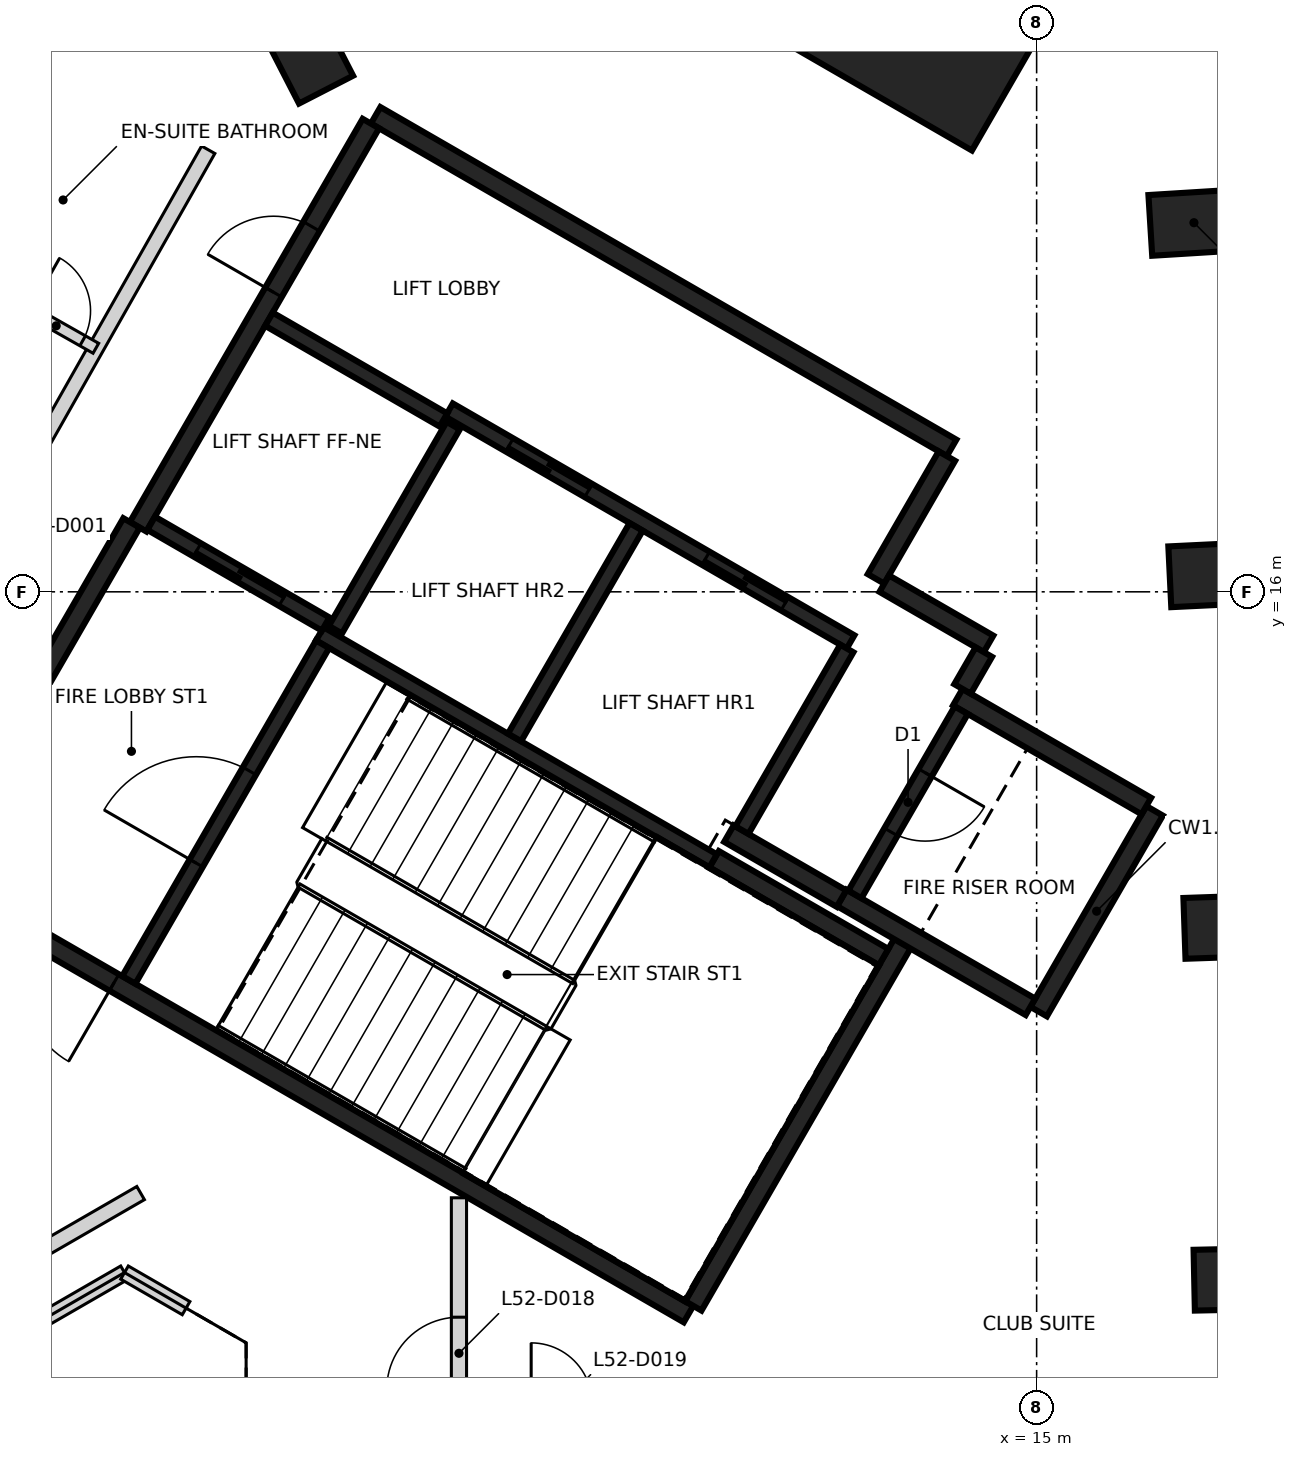
"""IFC4 building model, lengths in metres.
Left out: names, types, materials, properties, quantities, classifications, styles, units other than length and angle.
Written with IfcOpenShell. Run it as: python <this file> out.ifc"""

import sys

from ifc_helpers import new_model, si_unit, direction, frame, frame_2d, origin, origin_2d, place, context, subcontext, project, spatial, rectangle, extrude, element, fill, save


model = new_model("IFC4")
c1 = context("Model", 3, precision=1e-05, world=origin(), true_north=direction((0.0, 1.0)))
c2 = subcontext(c1, "Body", "Model", "MODEL_VIEW")
j1 = project(units=[si_unit("LENGTHUNIT", "METRE"), si_unit("PLANEANGLEUNIT", "RADIAN")], contexts=[c1])
p1 = place(None, origin())
s1 = spatial("IfcSite", under=j1, at=p1, CompositionType="ELEMENT")
p2 = place(p1, origin())
s2 = spatial("IfcBuilding", under=s1, at=p2, CompositionType="ELEMENT")
p3 = place(p2, frame((0.0, 0.0, 208.0)))
s3 = spatial("IfcBuildingStorey", under=s2, at=p3, CompositionType="ELEMENT", Elevation=208.0)
for number, where, z_axis, x_axis in (
    (1, (17.648, 6.956, -0.35), (0.0, 0.0, 1.0), (1.0, 0.021, 0.0)),
    (2, (17.519, 11.592, -0.35), (0.0, 0.0, 1.0), (0.999, 0.034, 0.0)),
    (3, (17.326, 16.226, -0.35), (0.0, 0.0, 1.0), (0.999, 0.048, 0.0)),
    (4, (17.07, 20.856, -0.35), (0.0, 0.0, 1.0), (0.998, 0.062, 0.0)),
    (5, (5.388, 23.118, -0.35), (0.0, 0.0, 1.0), (-0.458, 0.889, 0.0)),
):
    element("IfcColumn", number, at=place(p3, frame(where, z_axis=z_axis, x_axis=x_axis)), inside=s3, PredefinedType="COLUMN", context=c2, shape_type="SweptSolid", body=[
        extrude(rectangle(XDim=1.15, YDim=0.8, at=origin_2d()), origin(), (0.0, 0.0, 1.0), 2.736),
    ])
p4 = place(p3, frame((13.78, 23.867, -0.35), z_axis=(0.0, 0.0, 1.0), x_axis=(0.5, 0.866025403784, 0.0)))
e6 = element("IfcColumn", 6, at=p4, inside=s3, PredefinedType="COLUMN", context=c2, shape_type="SweptSolid", body=[
    extrude(rectangle(XDim=3.2, YDim=2.7, at=origin_2d()), origin(), (0.0, 0.0, 1.0), 3.55),
])
p5 = place(p3, frame((10.42, 6.498, 0.0), z_axis=(0.0, 0.0, 1.0), x_axis=(-0.866021906294, 0.500006057782, 0.0)))
e7 = element("IfcWall", 7, at=p5, inside=s3, PredefinedType="SHEAR", context=c2, shape_type="SweptSolid", body=[
    extrude(rectangle(XDim=11.55, YDim=0.25, at=frame_2d((5.775, 0.0))), origin(), (0.0, 0.0, 1.0), 3.2),
])
p6 = place(p5, frame((10.025, 0.0, 0.0)))
e8 = element("IfcOpeningElement", 8, at=p6, cuts=e7, PredefinedType="OPENING", context=c2, shape_type="SweptSolid", body=[
    extrude(rectangle(XDim=1.2, YDim=2.1, at=frame_2d((0.6, 1.05))), frame((0.0, 0.135, 0.0), z_axis=(0.0, -1.0, 0.0), x_axis=(1.0, 0.0, 0.0)), (0.0, 0.0, 1.0), 0.27),
])
p7 = place(p5, frame((8.725, 0.0, 0.0)))
e9 = element("IfcOpeningElement", 9, at=p7, cuts=e7, PredefinedType="OPENING", context=c2, shape_type="SweptSolid", body=[
    extrude(rectangle(XDim=1.2, YDim=2.1, at=frame_2d((0.6, 1.05))), frame((0.0, 0.135, 0.0), z_axis=(0.0, -1.0, 0.0), x_axis=(1.0, 0.0, 0.0)), (0.0, 0.0, 1.0), 0.27),
])
p8 = place(p3, frame((6.304, 22.269, 0.0), z_axis=(0.0, 0.0, 1.0), x_axis=(0.866022959057, -0.500004234368, 0.0)))
e10 = element("IfcWall", 10, at=p8, inside=s3, PredefinedType="SHEAR", context=c2, shape_type="SweptSolid", body=[
    extrude(rectangle(XDim=8.75, YDim=0.25, at=frame_2d((4.375, 0.0))), origin(), (0.0, 0.0, 1.0), 3.2),
])
p9 = place(p3, frame((3.179, 16.856, 0.0), z_axis=(0.0, 0.0, 1.0), x_axis=(0.500001955336, 0.866024274868, 0.0)))
e11 = element("IfcWall", 11, at=p9, inside=s3, PredefinedType="SHEAR", context=c2, shape_type="SweptSolid", body=[
    extrude(rectangle(XDim=6.125, YDim=0.25, at=frame_2d((3.062, 0.0))), origin(), (0.0, 0.0, 1.0), 3.2),
])
p10 = place(p9, frame((3.563, 0.0, 0.0)))
e12 = element("IfcOpeningElement", 12, at=p10, cuts=e11, PredefinedType="OPENING", context=c2, shape_type="SweptSolid", body=[
    extrude(rectangle(XDim=1.0, YDim=2.1, at=frame_2d((0.5, 1.05))), frame((0.0, 0.135, 0.0), z_axis=(0.0, -1.0, 0.0), x_axis=(1.0, 0.0, 0.0)), (0.0, 0.0, 1.0), 0.27),
])
p11 = place(p3, frame((0.48, 12.381, 0.0), z_axis=(0.0, 0.0, 1.0), x_axis=(0.49999885962, 0.866026062182, 0.0)))
e13 = element("IfcWall", 13, at=p11, inside=s3, PredefinedType="SHEAR", context=c2, shape_type="SweptSolid", body=[
    extrude(rectangle(XDim=5.225, YDim=0.25, at=frame_2d((2.612, 0.0))), origin(), (0.0, 0.0, 1.0), 3.2),
])
p12 = place(p3, frame((13.238, 11.378, 0.0), z_axis=(0.0, 0.0, 1.0), x_axis=(-0.500008851346, -0.866020293397, 0.0)))
e14 = element("IfcWall", 14, at=p12, inside=s3, PredefinedType="SHEAR", context=c2, shape_type="SweptSolid", body=[
    extrude(rectangle(XDim=5.51, YDim=0.25, at=frame_2d((2.755, 0.0))), origin(), (0.0, 0.0, 1.0), 3.2),
])
p13 = place(p3, frame((16.552, 13.119, 0.0), z_axis=(0.0, 0.0, 1.0), x_axis=(-0.499978833458, -0.866037623948, 0.0)))
e15 = element("IfcWall", 15, at=p13, inside=s3, PredefinedType="SHEAR", context=c2, shape_type="SweptSolid", body=[
    extrude(rectangle(XDim=3.05, YDim=0.25, at=frame_2d((1.525, 0.0))), origin(), (0.0, 0.0, 1.0), 3.2),
])
p14 = place(p3, frame((14.918, 10.54, 0.0), z_axis=(0.0, 0.0, 1.0), x_axis=(-0.866063538972, 0.499933942099, 0.0)))
e16 = element("IfcWall", 16, at=p14, inside=s3, PredefinedType="SHEAR", context=c2, shape_type="SweptSolid", body=[
    extrude(rectangle(XDim=2.865, YDim=0.25, at=frame_2d((1.432, 0.0))), origin(), (0.0, 0.0, 1.0), 3.2),
])
p15 = place(p3, frame((13.963, 14.614, 0.0), z_axis=(0.0, 0.0, 1.0), x_axis=(0.866042235819, -0.499970844928, 0.0)))
e17 = element("IfcWall", 17, at=p15, inside=s3, PredefinedType="SHEAR", context=c2, shape_type="SweptSolid", body=[
    extrude(rectangle(XDim=2.865, YDim=0.25, at=frame_2d((1.432, 0.0))), origin(), (0.0, 0.0, 1.0), 3.2),
])
p16 = place(p3, frame((10.757, 12.481, 0.0), z_axis=(0.0, 0.0, 1.0), x_axis=(0.866022940537, -0.500004266446, 0.0)))
e18 = element("IfcWall", 18, at=p16, inside=s3, PredefinedType="SHEAR", context=c2, shape_type="SweptSolid", body=[
    extrude(rectangle(XDim=2.575, YDim=0.25, at=frame_2d((1.287, 0.0))), origin(), (0.0, 0.0, 1.0), 3.2),
])
p17 = place(p3, frame((13.819, 17.785, 0.0), z_axis=(0.0, 0.0, 1.0), x_axis=(-0.500039802285, -0.866002422705, 0.0)))
e19 = element("IfcWall", 19, at=p17, inside=s3, PredefinedType="SHEAR", context=c2, shape_type="SweptSolid", body=[
    extrude(rectangle(XDim=1.865, YDim=0.25, at=frame_2d((0.932, 0.0))), origin(), (0.0, 0.0, 1.0), 3.2),
])
p18 = place(p3, frame((12.433, 11.964, 0.0), z_axis=(0.0, 0.0, 1.0), x_axis=(-0.866038183914, 0.499977863513, 0.0)))
e20 = element("IfcWall", 20, at=p18, inside=s3, PredefinedType="SHEAR", context=c2, shape_type="SweptSolid", body=[
    extrude(rectangle(XDim=1.71, YDim=0.25, at=frame_2d((0.855, 0.0))), origin(), (0.0, 0.0, 1.0), 3.2),
])
p19 = place(p3, frame((12.995, 16.108, 0.0), z_axis=(0.0, 0.0, 1.0), x_axis=(0.866044474677, -0.49996696679, 0.0)))
e21 = element("IfcWall", 21, at=p19, inside=s3, PredefinedType="SHEAR", context=c2, shape_type="SweptSolid", body=[
    extrude(rectangle(XDim=1.584, YDim=0.25, at=frame_2d((0.792, 0.0))), origin(), (0.0, 0.0, 1.0), 3.2),
])
p20 = place(p3, frame((14.305, 15.207, 0.0), z_axis=(0.0, 0.0, 1.0), x_axis=(-0.499848422343, -0.866112899501, 0.0)))
e22 = element("IfcWall", 22, at=p20, inside=s3, PredefinedType="SHEAR", context=c2, shape_type="SweptSolid", body=[
    extrude(rectangle(XDim=0.559, YDim=0.25, at=frame_2d((0.28, 0.0))), origin(), (0.0, 0.0, 1.0), 3.2),
])
p21 = place(p3, frame((12.552, 15.342, 0.0), z_axis=(0.0, 0.0, 1.0), x_axis=(-0.866030299012, 0.499991521122, 0.0)))
e23 = element("IfcWall", 23, at=p21, inside=s3, PredefinedType="SHEAR", context=c2, shape_type="SweptSolid", body=[
    extrude(rectangle(XDim=6.1, YDim=0.2, at=frame_2d((3.05, 0.0))), origin(), (0.0, 0.0, 1.0), 3.2),
])
p22 = place(p21, frame((1.0, 0.0, 0.0)))
e24 = element("IfcOpeningElement", 24, at=p22, cuts=e23, PredefinedType="OPENING", context=c2, shape_type="SweptSolid", body=[
    extrude(rectangle(XDim=1.2, YDim=2.1, at=frame_2d((0.6, 1.05))), frame((0.0, 0.11, 0.0), z_axis=(0.0, -1.0, 0.0), x_axis=(1.0, 0.0, 0.0)), (0.0, 0.0, 1.0), 0.22),
])
p23 = place(p21, frame((3.982, 0.0, 0.0)))
e25 = element("IfcOpeningElement", 25, at=p23, cuts=e23, PredefinedType="OPENING", context=c2, shape_type="SweptSolid", body=[
    extrude(rectangle(XDim=1.2, YDim=2.1, at=frame_2d((0.6, 1.05))), frame((0.0, 0.11, 0.0), z_axis=(0.0, -1.0, 0.0), x_axis=(1.0, 0.0, 0.0)), (0.0, 0.0, 1.0), 0.22),
])
p24 = place(p3, frame((10.743, 12.46, 0.0), z_axis=(0.0, 0.0, 1.0), x_axis=(-0.866018848283, 0.500011354289, 0.0)))
e26 = element("IfcWall", 26, at=p24, inside=s3, PredefinedType="SHEAR", context=c2, shape_type="SweptSolid", body=[
    extrude(rectangle(XDim=5.974, YDim=0.2, at=frame_2d((2.987, 0.0))), origin(), (0.0, 0.0, 1.0), 3.2),
])
p25 = place(p3, frame((3.057, 10.895, 0.0), z_axis=(0.0, 0.0, 1.0), x_axis=(0.500027839223, 0.866009330205, 0.0)))
e27 = element("IfcWall", 27, at=p25, inside=s3, PredefinedType="SHEAR", context=c2, shape_type="SweptSolid", body=[
    extrude(rectangle(XDim=5.098, YDim=0.2, at=frame_2d((2.549, 0.0))), origin(), (0.0, 0.0, 1.0), 3.2),
])
p26 = place(p25, frame((1.774, 0.0, 0.0)))
e28 = element("IfcOpeningElement", 28, at=p26, cuts=e27, PredefinedType="OPENING", context=c2, shape_type="SweptSolid", body=[
    extrude(rectangle(XDim=1.4, YDim=2.1, at=frame_2d((0.7, 1.05))), frame((0.0, 0.11, 0.0), z_axis=(0.0, -1.0, 0.0), x_axis=(1.0, 0.0, 0.0)), (0.0, 0.0, 1.0), 0.22),
])
p27 = place(p3, frame((8.132, 14.084, 0.0), z_axis=(0.0, 0.0, 1.0), x_axis=(0.500030834389, 0.86600760081, 0.0)))
e29 = element("IfcWall", 29, at=p27, inside=s3, PredefinedType="SHEAR", context=c2, shape_type="SweptSolid", body=[
    extrude(rectangle(XDim=3.198, YDim=0.2, at=frame_2d((1.599, 0.0))), origin(), (0.0, 0.0, 1.0), 3.2),
])
p28 = place(p3, frame((14.008, 14.442, 0.0), z_axis=(0.0, 0.0, 1.0), x_axis=(-0.499986818241, -0.866033014143, 0.0)))
e30 = element("IfcWall", 30, at=p28, inside=s3, PredefinedType="SHEAR", context=c2, shape_type="SweptSolid", body=[
    extrude(rectangle(XDim=2.798, YDim=0.2, at=frame_2d((1.399, 0.0))), origin(), (0.0, 0.0, 1.0), 3.2),
])
p29 = place(p28, frame((0.949, 0.0, 0.0)))
e31 = element("IfcOpeningElement", 31, at=p29, cuts=e30, PredefinedType="OPENING", context=c2, shape_type="SweptSolid", body=[
    extrude(rectangle(XDim=0.9, YDim=2.1, at=frame_2d((0.45, 1.05))), frame((0.0, 0.11, 0.0), z_axis=(0.0, -1.0, 0.0), x_axis=(1.0, 0.0, 0.0)), (0.0, 0.0, 1.0), 0.22),
])
p30 = place(p3, frame((12.502, 15.255, 0.0), z_axis=(0.0, 0.0, 1.0), x_axis=(-0.499965018551, -0.866045599391, 0.0)))
e32 = element("IfcWall", 32, at=p30, inside=s3, PredefinedType="SHEAR", context=c2, shape_type="SweptSolid", body=[
    extrude(rectangle(XDim=2.759, YDim=0.2, at=frame_2d((1.379, 0.0))), origin(), (0.0, 0.0, 1.0), 3.2),
])
p31 = place(p3, frame((7.324, 18.187, 0.0), z_axis=(0.0, 0.0, 1.0), x_axis=(-0.499967891604, -0.866043940782, 0.0)))
e33 = element("IfcWall", 33, at=p31, inside=s3, PredefinedType="SHEAR", context=c2, shape_type="SweptSolid", body=[
    extrude(rectangle(XDim=3.1, YDim=0.2, at=frame_2d((1.55, 0.0))), origin(), (0.0, 0.0, 1.0), 3.2),
])
p32 = place(p3, frame((5.646, 15.576, 0.0), z_axis=(0.0, 0.0, 1.0), x_axis=(-0.866018407898, 0.500012117035, 0.0)))
e34 = element("IfcWall", 34, at=p32, inside=s3, PredefinedType="SHEAR", context=c2, shape_type="SweptSolid", body=[
    extrude(rectangle(XDim=2.651, YDim=0.2, at=frame_2d((1.325, 0.0))), origin(), (0.0, 0.0, 1.0), 3.2),
])
p33 = place(p32, frame((0.652, 0.0, 0.0)))
e35 = element("IfcOpeningElement", 35, at=p33, cuts=e34, PredefinedType="OPENING", context=c2, shape_type="SweptSolid", body=[
    extrude(rectangle(XDim=1.3, YDim=2.1, at=frame_2d((0.65, 1.05))), frame((0.0, 0.11, 0.0), z_axis=(0.0, -1.0, 0.0), x_axis=(1.0, 0.0, 0.0)), (0.0, 0.0, 1.0), 0.22),
])
p34 = place(p3, frame((7.196, 18.26, 0.0), z_axis=(0.0, 0.0, 1.0), x_axis=(-0.866018407898, 0.500012117035, 0.0)))
e36 = element("IfcWall", 36, at=p34, inside=s3, PredefinedType="SHEAR", context=c2, shape_type="SweptSolid", body=[
    extrude(rectangle(XDim=2.651, YDim=0.2, at=frame_2d((1.325, 0.0))), origin(), (0.0, 0.0, 1.0), 3.2),
])
p35 = place(p3, frame((-4.718, 3.511, 0.0), z_axis=(0.0, 0.0, 1.0), x_axis=(0.865989775611, 0.500061704731, 0.0)))
e37 = element("IfcWall", 37, at=p35, inside=s3, PredefinedType="PARTITIONING", context=c2, shape_type="SweptSolid", body=[
    extrude(rectangle(XDim=9.157, YDim=0.2, at=frame_2d((4.579, 0.0))), origin(), (0.0, 0.0, 1.0), 3.2),
])
p36 = place(p35, frame((4.128, 0.0, 0.0)))
e38 = element("IfcOpeningElement", 38, at=p36, cuts=e37, PredefinedType="OPENING", context=c2, shape_type="SweptSolid", body=[
    extrude(rectangle(XDim=0.9, YDim=2.1, at=frame_2d((0.45, 1.05))), frame((0.0, 0.11, 0.0), z_axis=(0.0, -1.0, 0.0), x_axis=(1.0, 0.0, 0.0)), (0.0, 0.0, 1.0), 0.22),
])
p37 = place(p3, frame((-1.086, 12.65, 0.0), z_axis=(0.0, 0.0, 1.0), x_axis=(0.492552173528, 0.87028291742, 0.0)))
e39 = element("IfcWall", 39, at=p37, inside=s3, PredefinedType="PARTITIONING", context=c2, shape_type="SweptSolid", body=[
    extrude(rectangle(XDim=10.531, YDim=0.2, at=frame_2d((5.266, 0.0))), origin(), (0.0, 0.0, 1.0), 3.2),
])
p38 = place(p37, frame((3.342, 0.0, 0.0)))
e40 = element("IfcOpeningElement", 40, at=p38, cuts=e39, PredefinedType="OPENING", context=c2, shape_type="SweptSolid", body=[
    extrude(rectangle(XDim=0.95, YDim=2.1, at=frame_2d((0.475, 1.05))), frame((0.0, 0.11, 0.0), z_axis=(0.0, -1.0, 0.0), x_axis=(1.0, 0.0, 0.0)), (0.0, 0.0, 1.0), 0.22),
])
p39 = place(p3, frame((7.4, -4.966, 0.0), z_axis=(0.0, 0.0, 1.0), x_axis=(0.0, 1.0, 0.0)))
e41 = element("IfcWall", 41, at=p39, inside=s3, PredefinedType="PARTITIONING", context=c2, shape_type="SweptSolid", body=[
    extrude(rectangle(XDim=12.994, YDim=0.2, at=frame_2d((6.497, 0.0))), origin(), (0.0, 0.0, 1.0), 3.2),
])
p40 = place(p39, frame((0.2, 0.0, 0.0)))
e42 = element("IfcOpeningElement", 42, at=p40, cuts=e41, PredefinedType="OPENING", context=c2, shape_type="SweptSolid", body=[
    extrude(rectangle(XDim=0.95, YDim=2.1, at=frame_2d((0.475, 1.05))), frame((0.0, 0.11, 0.0), z_axis=(0.0, -1.0, 0.0), x_axis=(1.0, 0.0, 0.0)), (0.0, 0.0, 1.0), 0.22),
])
p41 = place(p39, frame((10.473, 0.0, 0.0)))
e43 = element("IfcOpeningElement", 43, at=p41, cuts=e41, PredefinedType="OPENING", context=c2, shape_type="SweptSolid", body=[
    extrude(rectangle(XDim=0.95, YDim=2.1, at=frame_2d((0.475, 1.05))), frame((0.0, 0.11, 0.0), z_axis=(0.0, -1.0, 0.0), x_axis=(1.0, 0.0, 0.0)), (0.0, 0.0, 1.0), 0.22),
])
p42 = place(p3, frame((-4.318, 2.819, 0.0), z_axis=(0.0, 0.0, 1.0), x_axis=(0.866038843867, 0.499976720371, 0.0)))
e44 = element("IfcWall", 44, at=p42, inside=s3, PredefinedType="PARTITIONING", context=c2, shape_type="SweptSolid", body=[
    extrude(rectangle(XDim=8.45, YDim=0.2, at=frame_2d((4.225, 0.0))), origin(), (0.0, 0.0, 1.0), 3.2),
])
p43 = place(p3, frame((3.0, 7.044, 0.0), z_axis=(0.0, 0.0, 1.0), x_axis=(0.865872609263, -0.500264554538, 0.0)))
e45 = element("IfcWall", 45, at=p43, inside=s3, PredefinedType="PARTITIONING", context=c2, shape_type="SweptSolid", body=[
    extrude(rectangle(XDim=0.936, YDim=0.2, at=frame_2d((0.468, 0.0))), origin(), (0.0, 0.0, 1.0), 3.2),
])
p44 = place(p3, frame((0.274, 20.534, 0.0), z_axis=(0.0, 0.0, 1.0), x_axis=(0.870234176559, -0.492638283072, 0.0)))
e46 = element("IfcWall", 46, at=p44, inside=s3, PredefinedType="PARTITIONING", context=c2, shape_type="SweptSolid", body=[
    extrude(rectangle(XDim=2.699, YDim=0.15, at=frame_2d((1.35, 0.0))), origin(), (0.0, 0.0, 1.0), 2.386),
])
p45 = place(p44, frame((1.7, 0.0, 0.0)))
e47 = element("IfcOpeningElement", 47, at=p45, cuts=e46, PredefinedType="OPENING", context=c2, shape_type="SweptSolid", body=[
    extrude(rectangle(XDim=0.8, YDim=2.1, at=frame_2d((0.4, 1.05))), frame((0.0, 0.085, 0.0), z_axis=(0.0, -1.0, 0.0), x_axis=(1.0, 0.0, 0.0)), (0.0, 0.0, 1.0), 0.17),
])
p46 = place(p33, origin())
e48 = element("IfcDoor", 48, at=p46, inside=s3, OperationType="SLIDING_TO_RIGHT", PredefinedType="DOOR", context=c2, shape_type="SweptSolid", body=[
    extrude(rectangle(XDim=1.3, YDim=2.1, at=frame_2d((0.65, 1.05))), frame((0.0, 0.025, 0.0), z_axis=(0.0, -1.0, 0.0), x_axis=(1.0, 0.0, 0.0)), (0.0, 0.0, 1.0), 0.05),
])
fill(e35, e48)
p47 = place(p22, origin())
e49 = element("IfcDoor", 49, at=p47, inside=s3, OperationType="DOUBLE_DOOR_SLIDING", PredefinedType="DOOR", context=c2, shape_type="SweptSolid", body=[
    extrude(rectangle(XDim=1.2, YDim=2.1, at=frame_2d((0.6, 1.05))), frame((0.0, 0.025, 0.0), z_axis=(0.0, -1.0, 0.0), x_axis=(1.0, 0.0, 0.0)), (0.0, 0.0, 1.0), 0.05),
])
fill(e24, e49)
p48 = place(p23, origin())
e50 = element("IfcDoor", 50, at=p48, inside=s3, OperationType="DOUBLE_DOOR_SLIDING", PredefinedType="DOOR", context=c2, shape_type="SweptSolid", body=[
    extrude(rectangle(XDim=1.2, YDim=2.1, at=frame_2d((0.6, 1.05))), frame((0.0, 0.025, 0.0), z_axis=(0.0, -1.0, 0.0), x_axis=(1.0, 0.0, 0.0)), (0.0, 0.0, 1.0), 0.05),
])
fill(e25, e50)
p49 = place(p10, origin())
e51 = element("IfcDoor", 51, at=p49, inside=s3, OperationType="SINGLE_SWING_LEFT", PredefinedType="DOOR", context=c2, shape_type="SweptSolid", body=[
    extrude(rectangle(XDim=1.0, YDim=2.1, at=frame_2d((0.5, 1.05))), frame((0.0, 0.025, 0.0), z_axis=(0.0, -1.0, 0.0), x_axis=(1.0, 0.0, 0.0)), (0.0, 0.0, 1.0), 0.05),
])
fill(e12, e51)
p50 = place(p7, origin())
e52 = element("IfcDoor", 52, at=p50, inside=s3, OperationType="SINGLE_SWING_RIGHT", PredefinedType="DOOR", context=c2, shape_type="SweptSolid", body=[
    extrude(rectangle(XDim=1.2, YDim=2.1, at=frame_2d((0.6, 1.05))), frame((0.0, 0.025, 0.0), z_axis=(0.0, -1.0, 0.0), x_axis=(1.0, 0.0, 0.0)), (0.0, 0.0, 1.0), 0.05),
])
fill(e9, e52)
p51 = place(p26, origin())
e53 = element("IfcDoor", 53, at=p51, inside=s3, OperationType="SINGLE_SWING_RIGHT", PredefinedType="DOOR", context=c2, shape_type="SweptSolid", body=[
    extrude(rectangle(XDim=1.4, YDim=2.1, at=frame_2d((0.7, 1.05))), frame((0.0, 0.025, 0.0), z_axis=(0.0, -1.0, 0.0), x_axis=(1.0, 0.0, 0.0)), (0.0, 0.0, 1.0), 0.05),
])
fill(e28, e53)
p52 = place(p29, origin())
e54 = element("IfcDoor", 54, at=p52, inside=s3, OperationType="SINGLE_SWING_LEFT", PredefinedType="DOOR", context=c2, shape_type="SweptSolid", body=[
    extrude(rectangle(XDim=0.9, YDim=2.1, at=frame_2d((0.45, 1.05))), frame((0.0, 0.025, 0.0), z_axis=(0.0, -1.0, 0.0), x_axis=(1.0, 0.0, 0.0)), (0.0, 0.0, 1.0), 0.05),
])
fill(e31, e54)
p53 = place(p45, frame((0.8, 0.0, 0.0), z_axis=(0.0, 0.0, 1.0), x_axis=(-1.0, 0.0, 0.0)))
e55 = element("IfcDoor", 55, at=p53, inside=s3, OperationType="SINGLE_SWING_LEFT", PredefinedType="DOOR", context=c2, shape_type="SweptSolid", body=[
    extrude(rectangle(XDim=0.8, YDim=2.1, at=frame_2d((0.4, 1.05))), frame((0.0, 0.025, 0.0), z_axis=(0.0, -1.0, 0.0), x_axis=(1.0, 0.0, 0.0)), (0.0, 0.0, 1.0), 0.05),
])
fill(e47, e55)
p54 = place(p41, frame((0.95, 0.0, 0.0), z_axis=(0.0, 0.0, 1.0), x_axis=(-1.0, 0.0, 0.0)))
e56 = element("IfcDoor", 56, at=p54, inside=s3, OperationType="SINGLE_SWING_LEFT", PredefinedType="DOOR", context=c2, shape_type="SweptSolid", body=[
    extrude(rectangle(XDim=0.95, YDim=2.1, at=frame_2d((0.475, 1.05))), frame((0.0, 0.025, 0.0), z_axis=(0.0, -1.0, 0.0), x_axis=(1.0, 0.0, 0.0)), (0.0, 0.0, 1.0), 0.05),
])
fill(e43, e56)
save(model, sys.argv[1])
